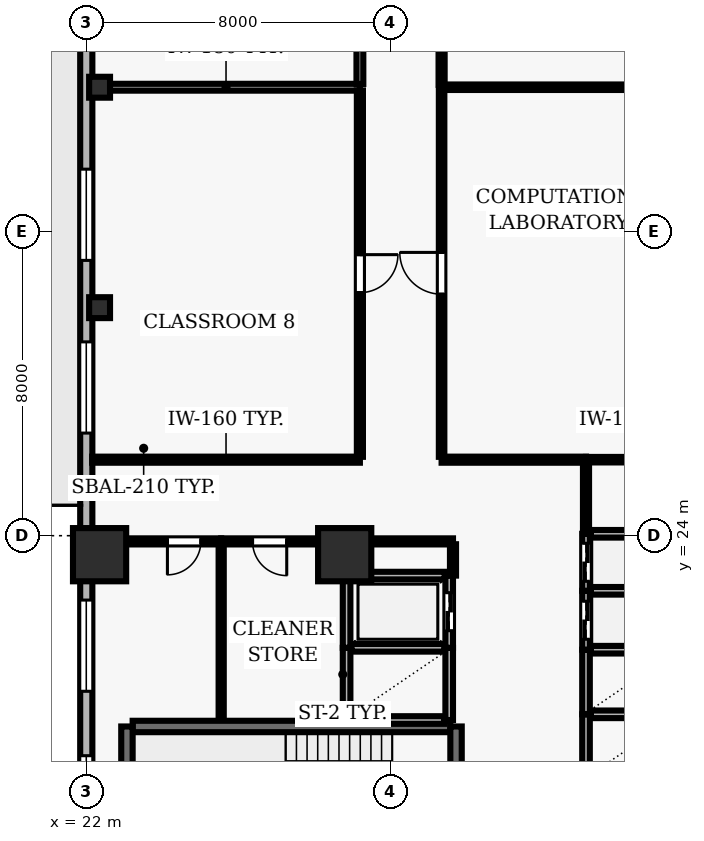
"""IFC4 building model, lengths in metres.
Left out: names, types, materials, properties, quantities, classifications, styles, units other than length and angle.
Written with IfcOpenShell. Run it as: python <this file> out.ifc"""

import sys

from ifc_helpers import new_model, si_unit, direction, frame, frame_2d, origin, origin_2d, place, context, subcontext, project, spatial, rectangle, hollow_rectangle, extrude, element, fill, save


model = new_model("IFC4")
c1 = context("Model", 3, precision=1e-05, world=origin(), true_north=direction((0.0, 1.0)))
c2 = subcontext(c1, "Body", "Model", "MODEL_VIEW")
j1 = project(units=[si_unit("LENGTHUNIT", "METRE"), si_unit("PLANEANGLEUNIT", "RADIAN")], contexts=[c1])
p1 = place(None, origin())
s1 = spatial("IfcSite", under=j1, at=p1, CompositionType="ELEMENT")
p2 = place(p1, origin())
s2 = spatial("IfcBuilding", under=s1, at=p2, CompositionType="ELEMENT")
p3 = place(p2, frame((0.0, 0.0, 34.9)))
s3 = spatial("IfcBuildingStorey", under=s2, at=p3, CompositionType="ELEMENT", Elevation=34.9)
for number, where, z_axis, x_axis in (
    (1, (22.35, 23.5, 0.0), (0.0, 0.0, 1.0), (1.0, 0.0, 0.0)),
    (2, (28.8, 23.5, 0.0), (0.0, 0.0, 1.0), (1.0, 0.0, 0.0)),
):
    element("IfcColumn", number, at=place(p3, frame(where, z_axis=z_axis, x_axis=x_axis)), inside=s3, PredefinedType="COLUMN", context=c2, shape_type="SweptSolid", body=[
        extrude(rectangle(XDim=1.4, YDim=1.4, at=origin_2d()), origin(), (0.0, 0.0, 1.0), 3.9),
    ])
for number, where, z_axis, x_axis in (
    (3, (22.35, 30.0, 0.0), (0.0, 0.0, 1.0), (1.0, 0.0, 0.0)),
    (4, (22.35, 35.8, 0.0), (0.0, 0.0, 1.0), (1.0, 0.0, 0.0)),
):
    element("IfcColumn", number, at=place(p3, frame(where, z_axis=z_axis, x_axis=x_axis)), inside=s3, PredefinedType="COLUMN", context=c2, shape_type="SweptSolid", body=[
        extrude(hollow_rectangle(XDim=0.55, YDim=0.55, WallThickness=0.025, at=origin_2d()), origin(), (0.0, 0.0, 1.0), 3.9),
    ])
p4 = place(p3, frame((22.0, 51.5, 0.0), z_axis=(0.0, 0.0, 1.0), x_axis=(0.0, -1.0, 0.0)))
e5 = element("IfcWall", 5, at=p4, inside=s3, PredefinedType="SOLIDWALL", context=c2, shape_type="SweptSolid", body=[
    extrude(rectangle(XDim=49.0, YDim=0.32, at=frame_2d((24.5, 0.0))), origin(), (0.0, 0.0, 1.0), 3.69),
])
p5 = place(p4, frame((12.1, 0.0, 0.0)))
e6 = element("IfcOpeningElement", 6, at=p5, cuts=e5, PredefinedType="OPENING", context=c2, shape_type="SweptSolid", body=[
    extrude(rectangle(XDim=1.0, YDim=2.2, at=frame_2d((0.5, 1.1))), frame((0.0, 0.17, 0.0), z_axis=(0.0, -1.0, 0.0), x_axis=(1.0, 0.0, 0.0)), (0.0, 0.0, 1.0), 0.34),
])
p6 = place(p4, frame((1.522, 0.0, 0.9)))
e7 = element("IfcOpeningElement", 7, at=p6, cuts=e5, PredefinedType="OPENING", context=c2, shape_type="SweptSolid", body=[
    extrude(rectangle(XDim=2.4, YDim=1.8, at=frame_2d((1.2, 0.9))), frame((0.0, 0.17, 0.0), z_axis=(0.0, -1.0, 0.0), x_axis=(1.0, 0.0, 0.0)), (0.0, 0.0, 1.0), 0.34),
])
p7 = place(p4, frame((17.856, 0.0, 0.9)))
e8 = element("IfcOpeningElement", 8, at=p7, cuts=e5, PredefinedType="OPENING", context=c2, shape_type="SweptSolid", body=[
    extrude(rectangle(XDim=2.4, YDim=1.8, at=frame_2d((1.2, 0.9))), frame((0.0, 0.17, 0.0), z_axis=(0.0, -1.0, 0.0), x_axis=(1.0, 0.0, 0.0)), (0.0, 0.0, 1.0), 0.34),
])
p8 = place(p4, frame((22.4, 0.0, 0.9)))
e9 = element("IfcOpeningElement", 9, at=p8, cuts=e5, PredefinedType="OPENING", context=c2, shape_type="SweptSolid", body=[
    extrude(rectangle(XDim=2.4, YDim=1.8, at=frame_2d((1.2, 0.9))), frame((0.0, 0.17, 0.0), z_axis=(0.0, -1.0, 0.0), x_axis=(1.0, 0.0, 0.0)), (0.0, 0.0, 1.0), 0.34),
])
p9 = place(p4, frame((29.194, 0.0, 0.9)))
e10 = element("IfcOpeningElement", 10, at=p9, cuts=e5, PredefinedType="OPENING", context=c2, shape_type="SweptSolid", body=[
    extrude(rectangle(XDim=2.4, YDim=1.8, at=frame_2d((1.2, 0.9))), frame((0.0, 0.17, 0.0), z_axis=(0.0, -1.0, 0.0), x_axis=(1.0, 0.0, 0.0)), (0.0, 0.0, 1.0), 0.34),
])
p10 = place(p4, frame((33.289, 0.0, 0.9)))
e11 = element("IfcOpeningElement", 11, at=p10, cuts=e5, PredefinedType="OPENING", context=c2, shape_type="SweptSolid", body=[
    extrude(rectangle(XDim=2.4, YDim=1.8, at=frame_2d((1.2, 0.9))), frame((0.0, 0.17, 0.0), z_axis=(0.0, -1.0, 0.0), x_axis=(1.0, 0.0, 0.0)), (0.0, 0.0, 1.0), 0.34),
])
p11 = place(p4, frame((39.633, 0.0, 0.9)))
e12 = element("IfcOpeningElement", 12, at=p11, cuts=e5, PredefinedType="OPENING", context=c2, shape_type="SweptSolid", body=[
    extrude(rectangle(XDim=2.4, YDim=1.8, at=frame_2d((1.2, 0.9))), frame((0.0, 0.17, 0.0), z_axis=(0.0, -1.0, 0.0), x_axis=(1.0, 0.0, 0.0)), (0.0, 0.0, 1.0), 0.34),
])
p12 = place(p3, frame((31.58, 18.98, 0.0), z_axis=(0.0, 0.0, 1.0), x_axis=(-1.0, 0.0, 0.0)))
e13 = element("IfcWall", 13, at=p12, inside=s3, PredefinedType="SHEAR", context=c2, shape_type="SweptSolid", body=[
    extrude(rectangle(XDim=8.36, YDim=0.3, at=frame_2d((4.18, 0.0))), origin(), (0.0, 0.0, 1.0), 3.69),
])
p13 = place(p3, frame((23.07, 18.98, 0.0), z_axis=(0.0, 0.0, 1.0), x_axis=(0.0, -1.0, 0.0)))
e14 = element("IfcWall", 14, at=p13, inside=s3, PredefinedType="SHEAR", context=c2, shape_type="SweptSolid", body=[
    extrude(rectangle(XDim=3.51, YDim=0.3, at=frame_2d((1.755, 0.0))), origin(), (0.0, 0.0, 1.0), 3.69),
])
p14 = place(p3, frame((31.73, 15.47, 0.0), z_axis=(0.0, 0.0, 1.0), x_axis=(0.0, 1.0, 0.0)))
e15 = element("IfcWall", 15, at=p14, inside=s3, PredefinedType="SHEAR", context=c2, shape_type="SweptSolid", body=[
    extrude(rectangle(XDim=3.51, YDim=0.3, at=frame_2d((1.755, 0.0))), origin(), (0.0, 0.0, 1.0), 3.69),
])
p15 = place(p14, frame((1.18, 0.0, 0.0)))
e16 = element("IfcOpeningElement", 16, at=p15, cuts=e15, PredefinedType="OPENING", context=c2, shape_type="SweptSolid", body=[
    extrude(rectangle(XDim=1.15, YDim=2.15, at=frame_2d((0.575, 1.075))), frame((0.0, 0.16, 0.0), z_axis=(0.0, -1.0, 0.0), x_axis=(1.0, 0.0, 0.0)), (0.0, 0.0, 1.0), 0.32),
])
p16 = place(p3, frame((35.15, 19.3, 0.0), z_axis=(0.0, 0.0, 1.0), x_axis=(0.0, -1.0, 0.0)))
e17 = element("IfcWall", 17, at=p16, inside=s3, PredefinedType="SOLIDWALL", context=c2, shape_type="SweptSolid", body=[
    extrude(rectangle(XDim=1.7, YDim=0.2, at=frame_2d((0.85, 0.0))), origin(), (0.0, 0.0, 1.0), 3.69),
])
p17 = place(p3, frame((37.42, 19.3, 0.0), z_axis=(0.0, 0.0, 1.0), x_axis=(-1.0, 0.0, 0.0)))
e18 = element("IfcWall", 18, at=p17, inside=s3, PredefinedType="SOLIDWALL", context=c2, shape_type="SweptSolid", body=[
    extrude(rectangle(XDim=2.14, YDim=0.2, at=frame_2d((1.07, 0.0))), origin(), (0.0, 0.0, 1.0), 3.69),
])
p18 = place(p3, frame((35.15, 21.0, 0.0), z_axis=(0.0, 0.0, 1.0), x_axis=(0.0, -1.0, 0.0)))
e19 = element("IfcWall", 19, at=p18, inside=s3, PredefinedType="SOLIDWALL", context=c2, shape_type="SweptSolid", body=[
    extrude(rectangle(XDim=1.7, YDim=0.2, at=frame_2d((0.85, 0.0))), origin(), (0.0, 0.0, 1.0), 3.69),
])
p19 = place(p3, frame((37.42, 21.0, 0.0), z_axis=(0.0, 0.0, 1.0), x_axis=(-1.0, 0.0, 0.0)))
e20 = element("IfcWall", 20, at=p19, inside=s3, PredefinedType="SOLIDWALL", context=c2, shape_type="SweptSolid", body=[
    extrude(rectangle(XDim=2.14, YDim=0.2, at=frame_2d((1.07, 0.0))), origin(), (0.0, 0.0, 1.0), 3.69),
])
for number, where, z_axis, x_axis in (
    (21, (28.85, 21.05, 0.0), (0.0, 0.0, 1.0), (0.0, -1.0, 0.0)),
    (22, (31.55, 19.15, 0.0), (0.0, 0.0, 1.0), (0.0, 1.0, 0.0)),
):
    element("IfcWall", number, at=place(p3, frame(where, z_axis=z_axis, x_axis=x_axis)), inside=s3, PredefinedType="SOLIDWALL", context=c2, shape_type="SweptSolid", body=[
        extrude(rectangle(XDim=1.9, YDim=0.2, at=frame_2d((0.95, 0.0))), origin(), (0.0, 0.0, 1.0), 3.69),
    ])
for number, where, z_axis, x_axis in (
    (23, (28.98, 19.15, 0.0), (0.0, 0.0, 1.0), (1.0, 0.0, 0.0)),
    (24, (31.42, 21.05, 0.0), (0.0, 0.0, 1.0), (-1.0, 0.0, 0.0)),
):
    element("IfcWall", number, at=place(p3, frame(where, z_axis=z_axis, x_axis=x_axis)), inside=s3, PredefinedType="SOLIDWALL", context=c2, shape_type="SweptSolid", body=[
        extrude(rectangle(XDim=2.44, YDim=0.2, at=frame_2d((1.22, 0.0))), origin(), (0.0, 0.0, 1.0), 3.69),
    ])
p20 = place(p3, frame((35.15, 22.55, 0.0), z_axis=(0.0, 0.0, 1.0), x_axis=(0.0, -1.0, 0.0)))
e25 = element("IfcWall", 25, at=p20, inside=s3, PredefinedType="SOLIDWALL", context=c2, shape_type="SweptSolid", body=[
    extrude(rectangle(XDim=1.55, YDim=0.2, at=frame_2d((0.775, 0.0))), origin(), (0.0, 0.0, 1.0), 3.69),
])
p21 = place(p20, frame((0.275, 0.0, 0.0)))
e26 = element("IfcOpeningElement", 26, at=p21, cuts=e25, PredefinedType="OPENING", context=c2, shape_type="SweptSolid", body=[
    extrude(rectangle(XDim=1.0, YDim=2.1, at=frame_2d((0.5, 1.05))), frame((0.0, 0.11, 0.0), z_axis=(0.0, -1.0, 0.0), x_axis=(1.0, 0.0, 0.0)), (0.0, 0.0, 1.0), 0.22),
])
p22 = place(p3, frame((37.42, 22.55, 0.0), z_axis=(0.0, 0.0, 1.0), x_axis=(-1.0, 0.0, 0.0)))
e27 = element("IfcWall", 27, at=p22, inside=s3, PredefinedType="SOLIDWALL", context=c2, shape_type="SweptSolid", body=[
    extrude(rectangle(XDim=2.14, YDim=0.2, at=frame_2d((1.07, 0.0))), origin(), (0.0, 0.0, 1.0), 3.69),
])
p23 = place(p3, frame((35.15, 24.05, 0.0), z_axis=(0.0, 0.0, 1.0), x_axis=(0.0, -1.0, 0.0)))
e28 = element("IfcWall", 28, at=p23, inside=s3, PredefinedType="SOLIDWALL", context=c2, shape_type="SweptSolid", body=[
    extrude(rectangle(XDim=1.5, YDim=0.2, at=frame_2d((0.75, 0.0))), origin(), (0.0, 0.0, 1.0), 3.69),
])
p24 = place(p23, frame((0.25, 0.0, 0.0)))
e29 = element("IfcOpeningElement", 29, at=p24, cuts=e28, PredefinedType="OPENING", context=c2, shape_type="SweptSolid", body=[
    extrude(rectangle(XDim=1.0, YDim=2.1, at=frame_2d((0.5, 1.05))), frame((0.0, 0.11, 0.0), z_axis=(0.0, -1.0, 0.0), x_axis=(1.0, 0.0, 0.0)), (0.0, 0.0, 1.0), 0.22),
])
p25 = place(p3, frame((37.42, 24.05, 0.0), z_axis=(0.0, 0.0, 1.0), x_axis=(-1.0, 0.0, 0.0)))
e30 = element("IfcWall", 30, at=p25, inside=s3, PredefinedType="SOLIDWALL", context=c2, shape_type="SweptSolid", body=[
    extrude(rectangle(XDim=2.14, YDim=0.2, at=frame_2d((1.07, 0.0))), origin(), (0.0, 0.0, 1.0), 3.69),
])
p26 = place(p3, frame((28.85, 22.95, 0.0), z_axis=(0.0, 0.0, 1.0), x_axis=(0.0, -1.0, 0.0)))
e31 = element("IfcWall", 31, at=p26, inside=s3, PredefinedType="SOLIDWALL", context=c2, shape_type="SweptSolid", body=[
    extrude(rectangle(XDim=1.9, YDim=0.2, at=frame_2d((0.95, 0.0))), origin(), (0.0, 0.0, 1.0), 3.69),
])
p27 = place(p3, frame((31.55, 21.05, 0.0), z_axis=(0.0, 0.0, 1.0), x_axis=(0.0, 1.0, 0.0)))
e32 = element("IfcWall", 32, at=p27, inside=s3, PredefinedType="SOLIDWALL", context=c2, shape_type="SweptSolid", body=[
    extrude(rectangle(XDim=1.9, YDim=0.2, at=frame_2d((0.95, 0.0))), origin(), (0.0, 0.0, 1.0), 3.69),
])
p28 = place(p27, frame((0.45, 0.0, 0.0)))
e33 = element("IfcOpeningElement", 33, at=p28, cuts=e32, PredefinedType="OPENING", context=c2, shape_type="SweptSolid", body=[
    extrude(rectangle(XDim=1.0, YDim=2.1, at=frame_2d((0.5, 1.05))), frame((0.0, 0.11, 0.0), z_axis=(0.0, -1.0, 0.0), x_axis=(1.0, 0.0, 0.0)), (0.0, 0.0, 1.0), 0.22),
])
p29 = place(p3, frame((31.43, 22.95, 0.0), z_axis=(0.0, 0.0, 1.0), x_axis=(-1.0, 0.0, 0.0)))
e34 = element("IfcWall", 34, at=p29, inside=s3, PredefinedType="SOLIDWALL", context=c2, shape_type="SweptSolid", body=[
    extrude(rectangle(XDim=2.46, YDim=0.2, at=frame_2d((1.23, 0.0))), origin(), (0.0, 0.0, 1.0), 3.69),
])
p30 = place(p3, frame((25.55, 23.85, 0.0), z_axis=(0.0, 0.0, 1.0), x_axis=(-1.0, 0.0, 0.0)))
e35 = element("IfcWall", 35, at=p30, inside=s3, PredefinedType="PARTITIONING", context=c2, shape_type="SweptSolid", body=[
    extrude(rectangle(XDim=3.35, YDim=0.16, at=frame_2d((1.675, 0.0))), origin(), (0.0, 0.0, 1.0), 3.055),
])
p31 = place(p30, frame((0.535, 0.0, 0.0)))
e36 = element("IfcOpeningElement", 36, at=p31, cuts=e35, PredefinedType="OPENING", context=c2, shape_type="SweptSolid", body=[
    extrude(rectangle(XDim=0.88, YDim=2.1, at=frame_2d((0.44, 1.05))), frame((0.0, 0.09, 0.0), z_axis=(0.0, -1.0, 0.0), x_axis=(1.0, 0.0, 0.0)), (0.0, 0.0, 1.0), 0.18),
])
p32 = place(p3, frame((28.8, 23.85, 0.0), z_axis=(0.0, 0.0, 1.0), x_axis=(-1.0, 0.0, 0.0)))
e37 = element("IfcWall", 37, at=p32, inside=s3, PredefinedType="PARTITIONING", context=c2, shape_type="SweptSolid", body=[
    extrude(rectangle(XDim=3.25, YDim=0.16, at=frame_2d((1.625, 0.0))), origin(), (0.0, 0.0, 1.0), 3.055),
])
p33 = place(p32, frame((1.525, 0.0, 0.0)))
e38 = element("IfcOpeningElement", 38, at=p33, cuts=e37, PredefinedType="OPENING", context=c2, shape_type="SweptSolid", body=[
    extrude(rectangle(XDim=0.9, YDim=2.1, at=frame_2d((0.45, 1.05))), frame((0.0, 0.09, 0.0), z_axis=(0.0, -1.0, 0.0), x_axis=(1.0, 0.0, 0.0)), (0.0, 0.0, 1.0), 0.18),
])
p34 = place(p3, frame((28.8, 23.85, 0.0), z_axis=(0.0, 0.0, 1.0), x_axis=(1.0, 0.0, 0.0)))
e39 = element("IfcWall", 39, at=p34, inside=s3, PredefinedType="PARTITIONING", context=c2, shape_type="SweptSolid", body=[
    extrude(rectangle(XDim=2.85, YDim=0.16, at=frame_2d((1.425, 0.0))), origin(), (0.0, 0.0, 1.0), 3.69),
])
p35 = place(p3, frame((29.2, 26.0, 0.0), z_axis=(0.0, 0.0, 1.0), x_axis=(-1.0, 0.0, 0.0)))
e40 = element("IfcWall", 40, at=p35, inside=s3, PredefinedType="PARTITIONING", context=c2, shape_type="SweptSolid", body=[
    extrude(rectangle(XDim=7.045, YDim=0.16, at=frame_2d((3.522, 0.0))), origin(), (0.0, 0.0, 1.0), 3.69),
])
p36 = place(p3, frame((29.2, 35.8, 0.0), z_axis=(0.0, 0.0, 1.0), x_axis=(-1.0, 0.0, 0.0)))
e41 = element("IfcWall", 41, at=p36, inside=s3, PredefinedType="PARTITIONING", context=c2, shape_type="SweptSolid", body=[
    extrude(rectangle(XDim=7.045, YDim=0.18, at=frame_2d((3.522, 0.0))), origin(), (0.0, 0.0, 1.0), 3.055),
])
p37 = place(p3, frame((35.15, 26.0, 0.0), z_axis=(0.0, 0.0, 1.0), x_axis=(-1.0, 0.0, 0.0)))
e42 = element("IfcWall", 42, at=p37, inside=s3, PredefinedType="PARTITIONING", context=c2, shape_type="SweptSolid", body=[
    extrude(rectangle(XDim=3.8, YDim=0.16, at=frame_2d((1.9, 0.0))), origin(), (0.0, 0.0, 1.0), 3.69),
])
p38 = place(p3, frame((35.15, 26.0, 0.0), z_axis=(0.0, 0.0, 1.0), x_axis=(1.0, 0.0, 0.0)))
e43 = element("IfcWall", 43, at=p38, inside=s3, PredefinedType="PARTITIONING", context=c2, shape_type="SweptSolid", body=[
    extrude(rectangle(XDim=2.7, YDim=0.145, at=frame_2d((1.35, 0.0))), origin(), (0.0, 0.0, 1.0), 3.69),
])
p39 = place(p3, frame((37.845, 35.8, 0.0), z_axis=(0.0, 0.0, 1.0), x_axis=(-1.0, 0.0, 0.0)))
e44 = element("IfcWall", 44, at=p39, inside=s3, PredefinedType="PARTITIONING", context=c2, shape_type="SweptSolid", body=[
    extrude(rectangle(XDim=6.495, YDim=0.145, at=frame_2d((3.248, 0.0))), origin(), (0.0, 0.0, 1.0), 3.055),
])
p40 = place(p3, frame((25.55, 19.16, 0.0), z_axis=(0.0, 0.0, 1.0), x_axis=(0.0, 1.0, 0.0)))
e45 = element("IfcWall", 45, at=p40, inside=s3, PredefinedType="PARTITIONING", context=c2, shape_type="SweptSolid", body=[
    extrude(rectangle(XDim=4.615, YDim=0.135, at=frame_2d((2.308, 0.0))), origin(), (0.0, 0.0, 1.0), 3.69),
])
p41 = place(p3, frame((28.8, 22.95, 0.0), z_axis=(0.0, 0.0, 1.0), x_axis=(0.0, 1.0, 0.0)))
e46 = element("IfcWall", 46, at=p41, inside=s3, PredefinedType="PARTITIONING", context=c2, shape_type="SweptSolid", body=[
    extrude(rectangle(XDim=0.825, YDim=0.125, at=frame_2d((0.413, 0.0))), origin(), (0.0, 0.0, 1.0), 3.69),
])
p42 = place(p3, frame((29.2, 35.715, 0.0), z_axis=(0.0, 0.0, 1.0), x_axis=(0.0, -1.0, 0.0)))
e47 = element("IfcWall", 47, at=p42, inside=s3, PredefinedType="PARTITIONING", context=c2, shape_type="SweptSolid", body=[
    extrude(rectangle(XDim=9.64, YDim=0.16, at=frame_2d((4.82, 0.0))), origin(), (0.0, 0.0, 1.0), 3.69),
])
p43 = place(p42, frame((4.32, 0.0, 0.0)))
e48 = element("IfcOpeningElement", 48, at=p43, cuts=e47, PredefinedType="OPENING", context=c2, shape_type="SweptSolid", body=[
    extrude(rectangle(XDim=1.0, YDim=2.1, at=frame_2d((0.5, 1.05))), frame((0.0, 0.09, 0.0), z_axis=(0.0, -1.0, 0.0), x_axis=(1.0, 0.0, 0.0)), (0.0, 0.0, 1.0), 0.18),
])
p44 = place(p3, frame((29.2, 44.955, 0.0), z_axis=(0.0, 0.0, 1.0), x_axis=(0.0, -1.0, 0.0)))
e49 = element("IfcWall", 49, at=p44, inside=s3, PredefinedType="PARTITIONING", context=c2, shape_type="SweptSolid", body=[
    extrude(rectangle(XDim=9.07, YDim=0.18, at=frame_2d((4.535, 0.0))), origin(), (0.0, 0.0, 1.0), 3.69),
])
p45 = place(p44, frame((4.06, 0.0, 0.0)))
e50 = element("IfcOpeningElement", 50, at=p45, cuts=e49, PredefinedType="OPENING", context=c2, shape_type="SweptSolid", body=[
    extrude(rectangle(XDim=0.95, YDim=2.1, at=frame_2d((0.475, 1.05))), frame((0.0, 0.1, 0.0), z_axis=(0.0, -1.0, 0.0), x_axis=(1.0, 0.0, 0.0)), (0.0, 0.0, 1.0), 0.2),
])
p46 = place(p3, frame((31.35, 26.075, 0.0), z_axis=(0.0, 0.0, 1.0), x_axis=(0.0, 1.0, 0.0)))
e51 = element("IfcWall", 51, at=p46, inside=s3, PredefinedType="PARTITIONING", context=c2, shape_type="SweptSolid", body=[
    extrude(rectangle(XDim=9.657, YDim=0.145, at=frame_2d((4.829, 0.0))), origin(), (0.0, 0.0, 1.0), 3.69),
])
p47 = place(p46, frame((4.279, 0.0, 0.0)))
e52 = element("IfcOpeningElement", 52, at=p47, cuts=e51, PredefinedType="OPENING", context=c2, shape_type="SweptSolid", body=[
    extrude(rectangle(XDim=1.1, YDim=2.15, at=frame_2d((0.55, 1.075))), frame((0.0, 0.083, 0.0), z_axis=(0.0, -1.0, 0.0), x_axis=(1.0, 0.0, 0.0)), (0.0, 0.0, 1.0), 0.165),
])
p48 = place(p3, frame((31.35, 35.867, 0.0), z_axis=(0.0, 0.0, 1.0), x_axis=(0.0, 1.0, 0.0)))
e53 = element("IfcWall", 53, at=p48, inside=s3, PredefinedType="PARTITIONING", context=c2, shape_type="SweptSolid", body=[
    extrude(rectangle(XDim=9.116, YDim=0.16, at=frame_2d((4.558, 0.0))), origin(), (0.0, 0.0, 1.0), 3.69),
])
p49 = place(p48, frame((4.108, 0.0, 0.0)))
e54 = element("IfcOpeningElement", 54, at=p49, cuts=e53, PredefinedType="OPENING", context=c2, shape_type="SweptSolid", body=[
    extrude(rectangle(XDim=0.9, YDim=2.1, at=frame_2d((0.45, 1.05))), frame((0.0, 0.09, 0.0), z_axis=(0.0, -1.0, 0.0), x_axis=(1.0, 0.0, 0.0)), (0.0, 0.0, 1.0), 0.18),
])
p50 = place(p3, frame((31.65, 23.775, 0.0), z_axis=(0.0, 0.0, 1.0), x_axis=(0.0, -1.0, 0.0)))
e55 = element("IfcWall", 55, at=p50, inside=s3, PredefinedType="PARTITIONING", context=c2, shape_type="SweptSolid", body=[
    extrude(rectangle(XDim=0.825, YDim=0.16, at=frame_2d((0.413, 0.0))), origin(), (0.0, 0.0, 1.0), 3.69),
])
p51 = place(p3, frame((35.15, 24.07, 0.0), z_axis=(0.0, 0.0, 1.0), x_axis=(0.0, 1.0, 0.0)))
e56 = element("IfcWall", 56, at=p51, inside=s3, PredefinedType="PARTITIONING", context=c2, shape_type="SweptSolid", body=[
    extrude(rectangle(XDim=1.855, YDim=0.16, at=frame_2d((0.927, 0.0))), origin(), (0.0, 0.0, 1.0), 3.69),
])
p52 = place(p7, origin())
e57 = element("IfcWindow", 57, at=p52, inside=s3, PartitioningType="SINGLE_PANEL", PredefinedType="WINDOW", context=c2, shape_type="SweptSolid", body=[
    extrude(rectangle(XDim=2.4, YDim=1.8, at=frame_2d((1.2, 0.9))), frame((0.0, 0.03, 0.0), z_axis=(0.0, -1.0, 0.0), x_axis=(1.0, 0.0, 0.0)), (0.0, 0.0, 1.0), 0.06),
])
fill(e8, e57)
p53 = place(p8, origin())
e58 = element("IfcWindow", 58, at=p53, inside=s3, PartitioningType="SINGLE_PANEL", PredefinedType="WINDOW", context=c2, shape_type="SweptSolid", body=[
    extrude(rectangle(XDim=2.4, YDim=1.8, at=frame_2d((1.2, 0.9))), frame((0.0, 0.03, 0.0), z_axis=(0.0, -1.0, 0.0), x_axis=(1.0, 0.0, 0.0)), (0.0, 0.0, 1.0), 0.06),
])
fill(e9, e58)
p54 = place(p9, origin())
e59 = element("IfcWindow", 59, at=p54, inside=s3, PartitioningType="SINGLE_PANEL", PredefinedType="WINDOW", context=c2, shape_type="SweptSolid", body=[
    extrude(rectangle(XDim=2.4, YDim=1.8, at=frame_2d((1.2, 0.9))), frame((0.0, 0.03, 0.0), z_axis=(0.0, -1.0, 0.0), x_axis=(1.0, 0.0, 0.0)), (0.0, 0.0, 1.0), 0.06),
])
fill(e10, e59)
p55 = place(p10, origin())
e60 = element("IfcWindow", 60, at=p55, inside=s3, PartitioningType="SINGLE_PANEL", PredefinedType="WINDOW", context=c2, shape_type="SweptSolid", body=[
    extrude(rectangle(XDim=2.4, YDim=1.8, at=frame_2d((1.2, 0.9))), frame((0.0, 0.03, 0.0), z_axis=(0.0, -1.0, 0.0), x_axis=(1.0, 0.0, 0.0)), (0.0, 0.0, 1.0), 0.06),
])
fill(e11, e60)
p56 = place(p21, origin())
e61 = element("IfcDoor", 61, at=p56, inside=s3, OperationType="DOUBLE_DOOR_SLIDING", PredefinedType="DOOR", context=c2, shape_type="SweptSolid", body=[
    extrude(rectangle(XDim=1.0, YDim=2.1, at=frame_2d((0.5, 1.05))), frame((0.0, 0.025, 0.0), z_axis=(0.0, -1.0, 0.0), x_axis=(1.0, 0.0, 0.0)), (0.0, 0.0, 1.0), 0.05),
])
fill(e26, e61)
p57 = place(p24, origin())
e62 = element("IfcDoor", 62, at=p57, inside=s3, OperationType="DOUBLE_DOOR_SLIDING", PredefinedType="DOOR", context=c2, shape_type="SweptSolid", body=[
    extrude(rectangle(XDim=1.0, YDim=2.1, at=frame_2d((0.5, 1.05))), frame((0.0, 0.025, 0.0), z_axis=(0.0, -1.0, 0.0), x_axis=(1.0, 0.0, 0.0)), (0.0, 0.0, 1.0), 0.05),
])
fill(e29, e62)
p58 = place(p28, origin())
e63 = element("IfcDoor", 63, at=p58, inside=s3, OperationType="DOUBLE_DOOR_SLIDING", PredefinedType="DOOR", context=c2, shape_type="SweptSolid", body=[
    extrude(rectangle(XDim=1.0, YDim=2.1, at=frame_2d((0.5, 1.05))), frame((0.0, 0.025, 0.0), z_axis=(0.0, -1.0, 0.0), x_axis=(1.0, 0.0, 0.0)), (0.0, 0.0, 1.0), 0.05),
])
fill(e33, e63)
p59 = place(p31, origin())
e64 = element("IfcDoor", 64, at=p59, inside=s3, OperationType="SINGLE_SWING_RIGHT", PredefinedType="DOOR", context=c2, shape_type="SweptSolid", body=[
    extrude(rectangle(XDim=0.88, YDim=2.1, at=frame_2d((0.44, 1.05))), frame((0.0, 0.025, 0.0), z_axis=(0.0, -1.0, 0.0), x_axis=(1.0, 0.0, 0.0)), (0.0, 0.0, 1.0), 0.05),
])
fill(e36, e64)
p60 = place(p33, origin())
e65 = element("IfcDoor", 65, at=p60, inside=s3, OperationType="SINGLE_SWING_LEFT", PredefinedType="DOOR", context=c2, shape_type="SweptSolid", body=[
    extrude(rectangle(XDim=0.9, YDim=2.1, at=frame_2d((0.45, 1.05))), frame((0.0, 0.025, 0.0), z_axis=(0.0, -1.0, 0.0), x_axis=(1.0, 0.0, 0.0)), (0.0, 0.0, 1.0), 0.05),
])
fill(e38, e65)
p61 = place(p43, origin())
e66 = element("IfcDoor", 66, at=p61, inside=s3, OperationType="SINGLE_SWING_LEFT", PredefinedType="DOOR", context=c2, shape_type="SweptSolid", body=[
    extrude(rectangle(XDim=1.0, YDim=2.1, at=frame_2d((0.5, 1.05))), frame((0.0, 0.025, 0.0), z_axis=(0.0, -1.0, 0.0), x_axis=(1.0, 0.0, 0.0)), (0.0, 0.0, 1.0), 0.05),
])
fill(e48, e66)
p62 = place(p47, origin())
e67 = element("IfcDoor", 67, at=p62, inside=s3, OperationType="SINGLE_SWING_RIGHT", PredefinedType="DOOR", context=c2, shape_type="SweptSolid", body=[
    extrude(rectangle(XDim=1.1, YDim=2.15, at=frame_2d((0.55, 1.075))), frame((0.0, 0.025, 0.0), z_axis=(0.0, -1.0, 0.0), x_axis=(1.0, 0.0, 0.0)), (0.0, 0.0, 1.0), 0.05),
])
fill(e52, e67)
save(model, sys.argv[1])
